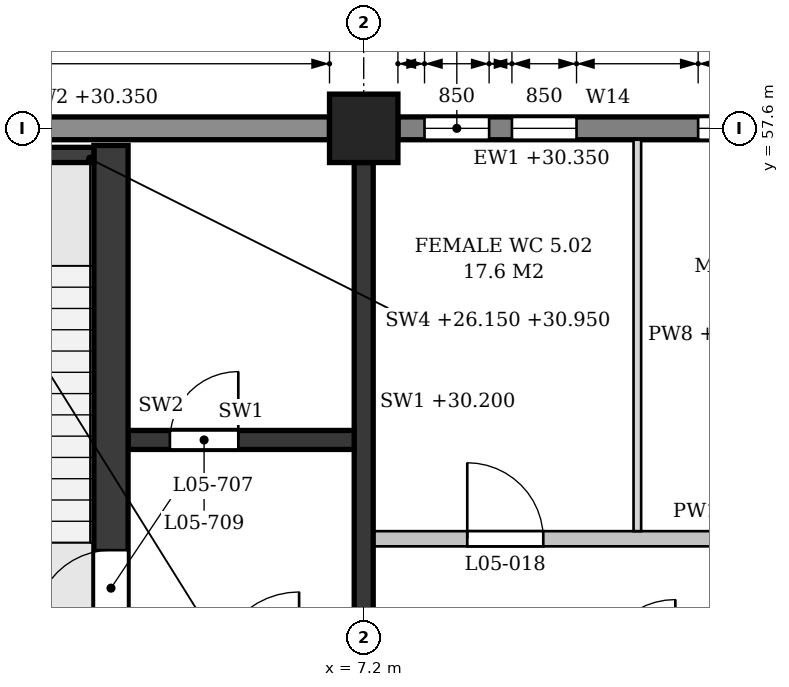
"""IFC4 building model, lengths in metres.
Left out: names, types, materials, properties, quantities, classifications, styles, units other than length and angle.
Written with IfcOpenShell. Run it as: python <this file> out.ifc"""

import sys

from ifc_helpers import new_model, si_unit, direction, frame, frame_2d, origin, origin_2d, place, context, subcontext, project, spatial, polyline, rectangle, outline, extrude, element, fill, save


model = new_model("IFC4")
c1 = context("Model", 3, precision=1e-05, world=origin(), true_north=direction((0.0, 1.0)))
c2 = subcontext(c1, "Body", "Model", "MODEL_VIEW")
j1 = project(units=[si_unit("LENGTHUNIT", "METRE"), si_unit("PLANEANGLEUNIT", "RADIAN")], contexts=[c1])
p1 = place(None, origin())
s1 = spatial("IfcSite", under=j1, at=p1, CompositionType="ELEMENT")
p2 = place(p1, origin())
s2 = spatial("IfcBuilding", under=s1, at=p2, CompositionType="ELEMENT")
p3 = place(p2, frame((0.0, 0.0, 26.4)))
s3 = spatial("IfcBuildingStorey", under=s2, at=p3, CompositionType="ELEMENT", Elevation=26.4)
p4 = place(p3, frame((7.2, 57.6, 0.0), z_axis=(0.0, 0.0, 1.0), x_axis=(1.0, 0.0, 0.0)))
e1 = element("IfcColumn", 1, at=p4, inside=s3, PredefinedType="COLUMN", context=c2, shape_type="SweptSolid", body=[
    extrude(rectangle(XDim=0.9, YDim=0.9, at=origin_2d()), origin(), (0.0, 0.0, 1.0), 4.8),
])
p5 = place(p3, frame((13.95, 57.6, 0.0), z_axis=(0.0, 0.0, 1.0), x_axis=(-1.0, 0.0, 0.0)))
e2 = element("IfcWall", 2, at=p5, inside=s3, PredefinedType="STANDARD", context=c2, shape_type="SweptSolid", body=[
    extrude(rectangle(XDim=6.3, YDim=0.3, at=frame_2d((3.15, 0.0))), origin(), (0.0, 0.0, 1.0), 3.95),
])
p6 = place(p5, frame((0.35, 0.0, 0.9)))
e3 = element("IfcOpeningElement", 3, at=p6, cuts=e2, PredefinedType="OPENING", context=c2, shape_type="SweptSolid", body=[
    extrude(outline(polyline([(0.0, 0.0), (0.85, 0.0), (0.85, 2.05), (0.425, 2.5), (0.0, 2.05), (0.0, 0.0)])), frame((0.0, 0.16, 0.0), z_axis=(0.0, -1.0, 0.0), x_axis=(1.0, 0.0, 0.0)), (0.0, 0.0, 1.0), 0.32),
])
p7 = place(p5, frame((1.5, 0.0, 0.9)))
e4 = element("IfcOpeningElement", 4, at=p7, cuts=e2, PredefinedType="OPENING", context=c2, shape_type="SweptSolid", body=[
    extrude(outline(polyline([(0.0, 0.0), (0.85, 0.0), (0.85, 2.05), (0.425, 2.5), (0.0, 2.05), (0.0, 0.0)])), frame((0.0, 0.16, 0.0), z_axis=(0.0, -1.0, 0.0), x_axis=(1.0, 0.0, 0.0)), (0.0, 0.0, 1.0), 0.32),
])
p8 = place(p5, frame((3.95, 0.0, 0.9)))
e5 = element("IfcOpeningElement", 5, at=p8, cuts=e2, PredefinedType="OPENING", context=c2, shape_type="SweptSolid", body=[
    extrude(outline(polyline([(0.0, 0.0), (0.85, 0.0), (0.85, 2.05), (0.425, 2.5), (0.0, 2.05), (0.0, 0.0)])), frame((0.0, 0.16, 0.0), z_axis=(0.0, -1.0, 0.0), x_axis=(1.0, 0.0, 0.0)), (0.0, 0.0, 1.0), 0.32),
])
p9 = place(p5, frame((5.1, 0.0, 0.9)))
e6 = element("IfcOpeningElement", 6, at=p9, cuts=e2, PredefinedType="OPENING", context=c2, shape_type="SweptSolid", body=[
    extrude(outline(polyline([(0.0, 0.0), (0.85, 0.0), (0.85, 2.05), (0.425, 2.5), (0.0, 2.05), (0.0, 0.0)])), frame((0.0, 0.16, 0.0), z_axis=(0.0, -1.0, 0.0), x_axis=(1.0, 0.0, 0.0)), (0.0, 0.0, 1.0), 0.32),
])
p10 = place(p3, frame((6.75, 57.6, 0.0), z_axis=(0.0, 0.0, 1.0), x_axis=(-1.0, 0.0, 0.0)))
e7 = element("IfcWall", 7, at=p10, inside=s3, PredefinedType="STANDARD", context=c2, shape_type="SweptSolid", body=[
    extrude(rectangle(XDim=6.3, YDim=0.3, at=frame_2d((3.15, 0.0))), origin(), (0.0, 0.0, 1.0), 3.95),
])
p11 = place(p10, frame((4.5, 0.0, 0.9)))
e8 = element("IfcOpeningElement", 8, at=p11, cuts=e7, PredefinedType="OPENING", context=c2, shape_type="SweptSolid", body=[
    extrude(outline(polyline([(0.0, 0.0), (0.9, 0.0), (0.9, 2.05), (0.45, 2.5), (0.0, 2.05), (0.0, 0.0)])), frame((0.0, 0.16, 0.0), z_axis=(0.0, -1.0, 0.0), x_axis=(1.0, 0.0, 0.0)), (0.0, 0.0, 1.0), 0.32),
])
p12 = place(p3, frame((7.2, 50.85, 0.0), z_axis=(0.0, 0.0, 1.0), x_axis=(0.0, 1.0, 0.0)))
e9 = element("IfcWall", 9, at=p12, inside=s3, PredefinedType="SHEAR", context=c2, shape_type="SweptSolid", body=[
    extrude(rectangle(XDim=6.3, YDim=0.25, at=frame_2d((3.15, 0.0))), origin(), (0.0, 0.0, 1.0), 3.8),
])
p13 = place(p3, frame((2.25, 57.25, -0.25), z_axis=(0.0, 0.0, 1.0), x_axis=(1.0, 0.0, 0.0)))
e10 = element("IfcWall", 10, at=p13, inside=s3, PredefinedType="SHEAR", context=c2, shape_type="SweptSolid", body=[
    extrude(rectangle(XDim=1.4, YDim=0.2, at=frame_2d((0.7, 0.0))), origin(), (0.0, 0.0, 1.0), 4.8),
])
p14 = place(p3, frame((3.875, 50.525, 0.0), z_axis=(0.0, 0.0, 1.0), x_axis=(0.0, 1.0, 0.0)))
e11 = element("IfcWall", 11, at=p14, inside=s3, PredefinedType="SHEAR", context=c2, shape_type="SweptSolid", body=[
    extrude(rectangle(XDim=6.85, YDim=0.45, at=frame_2d((3.425, 0.0))), origin(), (0.0, 0.0, 1.0), 4.55),
])
p15 = place(p14, frame((0.525, 0.0, 0.0)))
e12 = element("IfcOpeningElement", 12, at=p15, cuts=e11, PredefinedType="OPENING", context=c2, shape_type="SweptSolid", body=[
    extrude(rectangle(XDim=1.0, YDim=2.1, at=frame_2d((0.5, 1.05))), frame((0.0, 0.235, 0.0), z_axis=(0.0, -1.0, 0.0), x_axis=(1.0, 0.0, 0.0)), (0.0, 0.0, 1.0), 0.47),
])
p16 = place(p3, frame((4.1, 53.5, 0.0), z_axis=(0.0, 0.0, 1.0), x_axis=(1.0, 0.0, 0.0)))
e13 = element("IfcWall", 13, at=p16, inside=s3, PredefinedType="SHEAR", context=c2, shape_type="SweptSolid", body=[
    extrude(rectangle(XDim=2.975, YDim=0.25, at=frame_2d((1.487, 0.0))), origin(), (0.0, 0.0, 1.0), 4.55),
])
p17 = place(p16, frame((0.55, 0.0, 0.0)))
e14 = element("IfcOpeningElement", 14, at=p17, cuts=e13, PredefinedType="OPENING", context=c2, shape_type="SweptSolid", body=[
    extrude(rectangle(XDim=0.9, YDim=2.1, at=frame_2d((0.45, 1.05))), frame((0.0, 0.135, 0.0), z_axis=(0.0, -1.0, 0.0), x_axis=(1.0, 0.0, 0.0)), (0.0, 0.0, 1.0), 0.27),
])
p18 = place(p3, frame((7.325, 52.2, 0.0), z_axis=(0.0, 0.0, 1.0), x_axis=(1.0, 0.0, 0.0)))
e15 = element("IfcWall", 15, at=p18, inside=s3, PredefinedType="PARTITIONING", context=c2, shape_type="SweptSolid", body=[
    extrude(outline(polyline([(0.0, 0.0), (14.15, 0.0), (14.15, 3.8), (14.025, 3.8), (14.025, 4.55), (7.325, 4.55), (7.325, 3.8), (6.825, 3.8), (6.825, 4.55), (0.125, 4.55), (0.125, 3.8), (0.0, 3.8), (0.0, 0.0)])), frame((0.0, 0.1, 0.0), z_axis=(0.0, -1.0, 0.0), x_axis=(1.0, 0.0, 0.0)), (0.0, 0.0, 1.0), 0.2),
])
p19 = place(p18, frame((1.238, 0.0, 0.0)))
e16 = element("IfcOpeningElement", 16, at=p19, cuts=e15, PredefinedType="OPENING", context=c2, shape_type="SweptSolid", body=[
    extrude(rectangle(XDim=1.0, YDim=2.1, at=frame_2d((0.5, 1.05))), frame((0.0, 0.11, 0.0), z_axis=(0.0, -1.0, 0.0), x_axis=(1.0, 0.0, 0.0)), (0.0, 0.0, 1.0), 0.22),
])
p20 = place(p18, frame((4.775, 0.0, 0.0)))
e17 = element("IfcOpeningElement", 17, at=p20, cuts=e15, PredefinedType="OPENING", context=c2, shape_type="SweptSolid", body=[
    extrude(rectangle(XDim=1.0, YDim=2.1, at=frame_2d((0.5, 1.05))), frame((0.0, 0.11, 0.0), z_axis=(0.0, -1.0, 0.0), x_axis=(1.0, 0.0, 0.0)), (0.0, 0.0, 1.0), 0.22),
])
p21 = place(p18, frame((8.375, 0.0, 0.0)))
e18 = element("IfcOpeningElement", 18, at=p21, cuts=e15, PredefinedType="OPENING", context=c2, shape_type="SweptSolid", body=[
    extrude(rectangle(XDim=1.0, YDim=2.1, at=frame_2d((0.5, 1.05))), frame((0.0, 0.11, 0.0), z_axis=(0.0, -1.0, 0.0), x_axis=(1.0, 0.0, 0.0)), (0.0, 0.0, 1.0), 0.22),
])
p22 = place(p18, frame((11.913, 0.0, 0.0)))
e19 = element("IfcOpeningElement", 19, at=p22, cuts=e15, PredefinedType="OPENING", context=c2, shape_type="SweptSolid", body=[
    extrude(rectangle(XDim=1.0, YDim=2.1, at=frame_2d((0.5, 1.05))), frame((0.0, 0.11, 0.0), z_axis=(0.0, -1.0, 0.0), x_axis=(1.0, 0.0, 0.0)), (0.0, 0.0, 1.0), 0.22),
])
p23 = place(p3, frame((10.8, 52.3, 0.0), z_axis=(0.0, 0.0, 1.0), x_axis=(0.0, 1.0, 0.0)))
e20 = element("IfcWall", 20, at=p23, inside=s3, PredefinedType="PARTITIONING", context=c2, shape_type="SweptSolid", body=[
    extrude(rectangle(XDim=5.15, YDim=0.1, at=frame_2d((2.575, 0.0))), origin(), (0.0, 0.0, 1.0), 3.8),
])
p24 = place(p7, origin())
e21 = element("IfcWindow", 21, at=p24, inside=s3, PartitioningType="SINGLE_PANEL", PredefinedType="WINDOW", context=c2, shape_type="SweptSolid", body=[
    extrude(outline(polyline([(0.0, 0.0), (0.85, 0.0), (0.85, 2.05), (0.425, 2.5), (0.0, 2.05), (0.0, 0.0)])), frame((0.0, 0.03, 0.0), z_axis=(0.0, -1.0, 0.0), x_axis=(1.0, 0.0, 0.0)), (0.0, 0.0, 1.0), 0.06),
])
fill(e4, e21)
p25 = place(p8, origin())
e22 = element("IfcWindow", 22, at=p25, inside=s3, PartitioningType="SINGLE_PANEL", PredefinedType="WINDOW", context=c2, shape_type="SweptSolid", body=[
    extrude(outline(polyline([(0.0, 0.0), (0.85, 0.0), (0.85, 2.05), (0.425, 2.5), (0.0, 2.05), (0.0, 0.0)])), frame((0.0, 0.03, 0.0), z_axis=(0.0, -1.0, 0.0), x_axis=(1.0, 0.0, 0.0)), (0.0, 0.0, 1.0), 0.06),
])
fill(e5, e22)
p26 = place(p9, origin())
e23 = element("IfcWindow", 23, at=p26, inside=s3, PartitioningType="SINGLE_PANEL", PredefinedType="WINDOW", context=c2, shape_type="SweptSolid", body=[
    extrude(outline(polyline([(0.0, 0.0), (0.85, 0.0), (0.85, 2.05), (0.425, 2.5), (0.0, 2.05), (0.0, 0.0)])), frame((0.0, 0.03, 0.0), z_axis=(0.0, -1.0, 0.0), x_axis=(1.0, 0.0, 0.0)), (0.0, 0.0, 1.0), 0.06),
])
fill(e6, e23)
p27 = place(p15, origin())
e24 = element("IfcDoor", 24, at=p27, inside=s3, OperationType="SINGLE_SWING_LEFT", PredefinedType="DOOR", context=c2, shape_type="SweptSolid", body=[
    extrude(rectangle(XDim=1.0, YDim=2.1, at=frame_2d((0.5, 1.05))), frame((0.0, 0.025, 0.0), z_axis=(0.0, -1.0, 0.0), x_axis=(1.0, 0.0, 0.0)), (0.0, 0.0, 1.0), 0.05),
])
fill(e12, e24)
p28 = place(p17, origin())
e25 = element("IfcDoor", 25, at=p28, inside=s3, OperationType="SINGLE_SWING_RIGHT", PredefinedType="DOOR", context=c2, shape_type="SweptSolid", body=[
    extrude(rectangle(XDim=0.9, YDim=2.1, at=frame_2d((0.45, 1.05))), frame((0.0, 0.025, 0.0), z_axis=(0.0, -1.0, 0.0), x_axis=(1.0, 0.0, 0.0)), (0.0, 0.0, 1.0), 0.05),
])
fill(e14, e25)
p29 = place(p19, origin())
e26 = element("IfcDoor", 26, at=p29, inside=s3, OperationType="SINGLE_SWING_LEFT", PredefinedType="DOOR", context=c2, shape_type="SweptSolid", body=[
    extrude(rectangle(XDim=1.0, YDim=2.1, at=frame_2d((0.5, 1.05))), frame((0.0, 0.025, 0.0), z_axis=(0.0, -1.0, 0.0), x_axis=(1.0, 0.0, 0.0)), (0.0, 0.0, 1.0), 0.05),
])
fill(e16, e26)
save(model, sys.argv[1])
